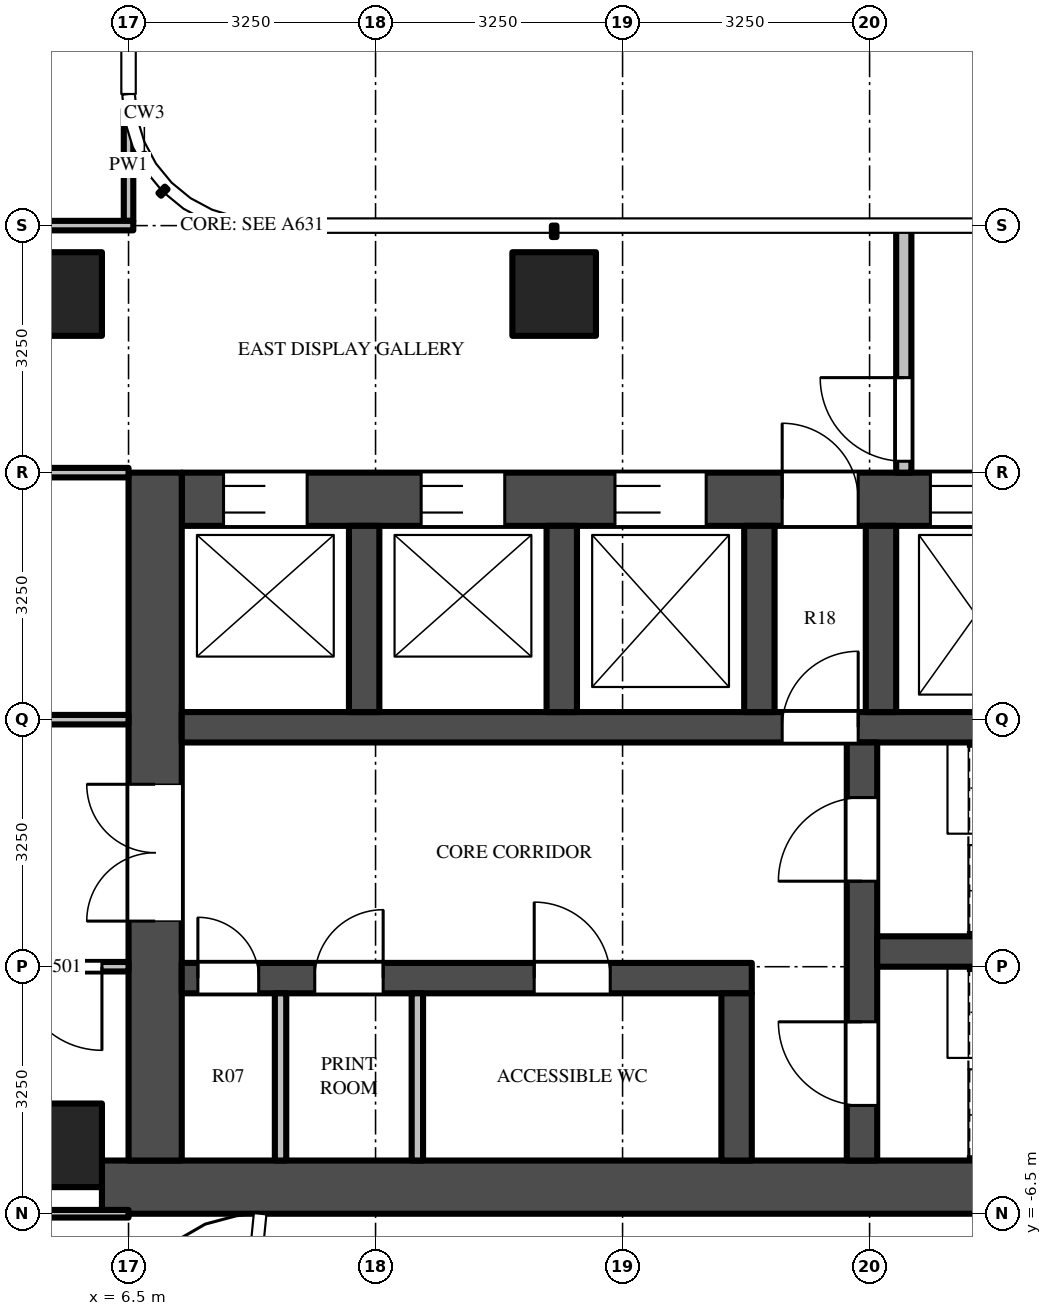
"""IFC4 building model, lengths in metres.
Left out: names, types, materials, properties, quantities, classifications, styles, units other than length and angle.
Written with IfcOpenShell. Run it as: python <this file> out.ifc"""

import sys

from ifc_helpers import new_model, si_unit, direction, frame, frame_2d, origin, origin_2d, place, context, subcontext, project, spatial, rectangle, extrude, source, transform, mapped, element, fill, save


model = new_model("IFC4")
c1 = context("Model", 3, precision=1e-05, world=origin(), true_north=direction((0.0, 1.0)))
c2 = subcontext(c1, "Body", "Model", "MODEL_VIEW")
j1 = project(units=[si_unit("LENGTHUNIT", "METRE"), si_unit("PLANEANGLEUNIT", "RADIAN")], contexts=[c1])
p1 = place(None, origin())
s1 = spatial("IfcSite", under=j1, at=p1, CompositionType="ELEMENT")
p2 = place(p1, origin())
s2 = spatial("IfcBuilding", under=s1, at=p2, CompositionType="ELEMENT")
p3 = place(p2, frame((0.0, 0.0, 248.0)))
s3 = spatial("IfcBuildingStorey", under=s2, at=p3, CompositionType="ELEMENT", Elevation=248.0)
m1 = source(origin(), c2, "Body", "SweptSolid", [
    extrude(rectangle(XDim=1.1, YDim=1.1, at=origin_2d()), origin(), (0.0, 0.0, 1.0), 3.9),
])
for number, where, z_axis, x_axis in (
    (1, (12.1, 5.6, 0.0), (0.0, 0.0, 1.0), (1.0, 0.0, 0.0)),
    (2, (5.6, 5.6, 0.0), (0.0, 0.0, 1.0), (1.0, 0.0, 0.0)),
    (3, (5.6, -5.6, 0.0), (0.0, 0.0, 1.0), (1.0, 0.0, 0.0)),
):
    element("IfcColumn", number, at=place(p3, frame(where, z_axis=z_axis, x_axis=x_axis)), inside=s3, PredefinedType="COLUMN", context=c2, shape_type="MappedRepresentation", body=[
        mapped(m1, transform((0.0, 0.0, 0.0))),
    ])
m2 = source(origin(), c2, "Body", "SweptSolid", [
    extrude(rectangle(XDim=16.6, YDim=0.7, at=frame_2d((8.3, 0.0))), origin(), (0.0, 0.0, 1.0), 3.7),
])
p4 = place(p3, frame((6.15, -6.15, 0.0), z_axis=(0.0, 0.0, 1.0), x_axis=(1.0, 0.0, 0.0)))
e4 = element("IfcWall", 4, at=p4, inside=s3, PredefinedType="SHEAR", context=c2, shape_type="MappedRepresentation", body=[
    mapped(m2, transform((0.0, 0.0, 0.0))),
])
m3 = source(origin(), c2, "Body", "SweptSolid", [
    extrude(rectangle(XDim=14.85, YDim=0.7, at=frame_2d((7.425, 0.0))), origin(), (0.0, 0.0, 1.0), 3.7),
])
p5 = place(p3, frame((7.2, 2.9, 0.0), z_axis=(0.0, 0.0, 1.0), x_axis=(1.0, 0.0, 0.0)))
e5 = element("IfcWall", 5, at=p5, inside=s3, PredefinedType="SHEAR", context=c2, shape_type="MappedRepresentation", body=[
    mapped(m3, transform((0.0, 0.0, 0.0))),
])
m4 = source(origin(), c2, "Body", "SweptSolid", [
    extrude(rectangle(XDim=1.1, YDim=2.1, at=frame_2d((0.55, 1.05))), frame((0.0, 0.36, 0.0), z_axis=(0.0, -1.0, 0.0), x_axis=(1.0, 0.0, 0.0)), (0.0, 0.0, 1.0), 0.72),
])
p6 = place(p5, frame((0.55, 0.0, 0.0)))
e6 = element("IfcOpeningElement", 6, at=p6, cuts=e5, PredefinedType="OPENING", context=c2, shape_type="MappedRepresentation", body=[
    mapped(m4, transform((0.0, 0.0, 0.0))),
])
p7 = place(p5, frame((3.15, 0.0, 0.0)))
e7 = element("IfcOpeningElement", 7, at=p7, cuts=e5, PredefinedType="OPENING", context=c2, shape_type="MappedRepresentation", body=[
    mapped(m4, transform((0.0, 0.0, 0.0))),
])
m5 = source(origin(), c2, "Body", "SweptSolid", [
    extrude(rectangle(XDim=1.2, YDim=2.1, at=frame_2d((0.6, 1.05))), frame((0.0, 0.36, 0.0), z_axis=(0.0, -1.0, 0.0), x_axis=(1.0, 0.0, 0.0)), (0.0, 0.0, 1.0), 0.72),
])
p8 = place(p5, frame((5.7, 0.0, 0.0)))
e8 = element("IfcOpeningElement", 8, at=p8, cuts=e5, PredefinedType="OPENING", context=c2, shape_type="MappedRepresentation", body=[
    mapped(m5, transform((0.0, 0.0, 0.0))),
])
m6 = source(origin(), c2, "Body", "SweptSolid", [
    extrude(rectangle(XDim=1.3, YDim=2.1, at=frame_2d((0.65, 1.05))), frame((0.0, 0.36, 0.0), z_axis=(0.0, -1.0, 0.0), x_axis=(1.0, 0.0, 0.0)), (0.0, 0.0, 1.0), 0.72),
])
p9 = place(p5, frame((12.2, 0.0, 0.0)))
e9 = element("IfcOpeningElement", 9, at=p9, cuts=e5, PredefinedType="OPENING", context=c2, shape_type="MappedRepresentation", body=[
    mapped(m6, transform((0.0, 0.0, 0.0))),
])
p10 = place(p5, frame((9.85, 0.0, 0.0)))
e10 = element("IfcOpeningElement", 10, at=p10, cuts=e5, PredefinedType="OPENING", context=c2, shape_type="MappedRepresentation", body=[
    mapped(m5, transform((0.0, 0.0, 0.0))),
])
m7 = source(origin(), c2, "Body", "SweptSolid", [
    extrude(rectangle(XDim=1.0, YDim=2.1, at=frame_2d((0.5, 1.05))), frame((0.0, 0.36, 0.0), z_axis=(0.0, -1.0, 0.0), x_axis=(1.0, 0.0, 0.0)), (0.0, 0.0, 1.0), 0.72),
])
p11 = place(p5, frame((7.9, 0.0, 0.0)))
e11 = element("IfcOpeningElement", 11, at=p11, cuts=e5, PredefinedType="OPENING", context=c2, shape_type="MappedRepresentation", body=[
    mapped(m7, transform((0.0, 0.0, 0.0))),
])
m8 = source(origin(), c2, "Body", "SweptSolid", [
    extrude(rectangle(XDim=9.05, YDim=0.7, at=frame_2d((4.525, 0.0))), origin(), (0.0, 0.0, 1.0), 3.7),
])
p12 = place(p3, frame((6.85, -5.8, 0.0), z_axis=(0.0, 0.0, 1.0), x_axis=(0.0, 1.0, 0.0)))
e12 = element("IfcWall", 12, at=p12, inside=s3, PredefinedType="SHEAR", context=c2, shape_type="MappedRepresentation", body=[
    mapped(m8, transform((0.0, 0.0, 0.0))),
])
m9 = source(origin(), c2, "Body", "SweptSolid", [
    extrude(rectangle(XDim=1.8, YDim=2.1, at=frame_2d((0.9, 1.05))), frame((0.0, 0.36, 0.0), z_axis=(0.0, -1.0, 0.0), x_axis=(1.0, 0.0, 0.0)), (0.0, 0.0, 1.0), 0.72),
])
p13 = place(p12, frame((3.15, 0.0, 0.0)))
e13 = element("IfcOpeningElement", 13, at=p13, cuts=e12, PredefinedType="OPENING", context=c2, shape_type="MappedRepresentation", body=[
    mapped(m9, transform((0.0, 0.0, 0.0))),
])
m10 = source(origin(), c2, "Body", "SweptSolid", [
    extrude(rectangle(XDim=7.5, YDim=0.4, at=frame_2d((3.75, 0.0))), origin(), (0.0, 0.0, 1.0), 3.7),
])
p14 = place(p3, frame((7.2, -3.4, 0.0), z_axis=(0.0, 0.0, 1.0), x_axis=(1.0, 0.0, 0.0)))
e14 = element("IfcWall", 14, at=p14, inside=s3, PredefinedType="SHEAR", context=c2, shape_type="MappedRepresentation", body=[
    mapped(m10, transform((0.0, 0.0, 0.0))),
])
m11 = source(origin(), c2, "Body", "SweptSolid", [
    extrude(rectangle(XDim=0.8, YDim=2.1, at=frame_2d((0.4, 1.05))), frame((0.0, 0.21, 0.0), z_axis=(0.0, -1.0, 0.0), x_axis=(1.0, 0.0, 0.0)), (0.0, 0.0, 1.0), 0.42),
])
p15 = place(p14, frame((0.212, 0.0, 0.0)))
e15 = element("IfcOpeningElement", 15, at=p15, cuts=e14, PredefinedType="OPENING", context=c2, shape_type="MappedRepresentation", body=[
    mapped(m11, transform((0.0, 0.0, 0.0))),
])
m12 = source(origin(), c2, "Body", "SweptSolid", [
    extrude(rectangle(XDim=0.9, YDim=2.1, at=frame_2d((0.45, 1.05))), frame((0.0, 0.21, 0.0), z_axis=(0.0, -1.0, 0.0), x_axis=(1.0, 0.0, 0.0)), (0.0, 0.0, 1.0), 0.42),
])
p16 = place(p14, frame((1.75, 0.0, 0.0)))
e16 = element("IfcOpeningElement", 16, at=p16, cuts=e14, PredefinedType="OPENING", context=c2, shape_type="MappedRepresentation", body=[
    mapped(m12, transform((0.0, 0.0, 0.0))),
])
m13 = source(origin(), c2, "Body", "SweptSolid", [
    extrude(rectangle(XDim=1.0, YDim=2.1, at=frame_2d((0.5, 1.05))), frame((0.0, 0.21, 0.0), z_axis=(0.0, -1.0, 0.0), x_axis=(1.0, 0.0, 0.0)), (0.0, 0.0, 1.0), 0.42),
])
p17 = place(p14, frame((4.637, 0.0, 0.0)))
e17 = element("IfcOpeningElement", 17, at=p17, cuts=e14, PredefinedType="OPENING", context=c2, shape_type="MappedRepresentation", body=[
    mapped(m13, transform((0.0, 0.0, 0.0))),
])
m14 = source(origin(), c2, "Body", "SweptSolid", [
    extrude(rectangle(XDim=14.85, YDim=0.4, at=frame_2d((7.425, 0.0))), origin(), (0.0, 0.0, 1.0), 3.7),
])
p18 = place(p3, frame((7.2, -0.1, 0.0), z_axis=(0.0, 0.0, 1.0), x_axis=(1.0, 0.0, 0.0)))
e18 = element("IfcWall", 18, at=p18, inside=s3, PredefinedType="SHEAR", context=c2, shape_type="MappedRepresentation", body=[
    mapped(m14, transform((0.0, 0.0, 0.0))),
])
p19 = place(p18, frame((7.9, 0.0, 0.0)))
e19 = element("IfcOpeningElement", 19, at=p19, cuts=e18, PredefinedType="OPENING", context=c2, shape_type="MappedRepresentation", body=[
    mapped(m13, transform((0.0, 0.0, 0.0))),
])
m15 = source(origin(), c2, "Body", "SweptSolid", [
    extrude(rectangle(XDim=5.5, YDim=0.4, at=frame_2d((2.75, 0.0))), origin(), (0.0, 0.0, 1.0), 3.7),
])
p20 = place(p3, frame((16.15, -5.8, 0.0), z_axis=(0.0, 0.0, 1.0), x_axis=(0.0, 1.0, 0.0)))
e20 = element("IfcWall", 20, at=p20, inside=s3, PredefinedType="SHEAR", context=c2, shape_type="MappedRepresentation", body=[
    mapped(m15, transform((0.0, 0.0, 0.0))),
])
m16 = source(origin(), c2, "Body", "SweptSolid", [
    extrude(rectangle(XDim=1.1, YDim=2.1, at=frame_2d((0.55, 1.05))), frame((0.0, 0.21, 0.0), z_axis=(0.0, -1.0, 0.0), x_axis=(1.0, 0.0, 0.0)), (0.0, 0.0, 1.0), 0.42),
])
p21 = place(p20, frame((0.725, 0.0, 0.0)))
e21 = element("IfcOpeningElement", 21, at=p21, cuts=e20, PredefinedType="OPENING", context=c2, shape_type="MappedRepresentation", body=[
    mapped(m16, transform((0.0, 0.0, 0.0))),
])
p22 = place(p20, frame((3.675, 0.0, 0.0)))
e22 = element("IfcOpeningElement", 22, at=p22, cuts=e20, PredefinedType="OPENING", context=c2, shape_type="MappedRepresentation", body=[
    mapped(m16, transform((0.0, 0.0, 0.0))),
])
m17 = source(origin(), c2, "Body", "SweptSolid", [
    extrude(rectangle(XDim=5.7, YDim=0.4, at=frame_2d((2.85, 0.0))), origin(), (0.0, 0.0, 1.0), 3.7),
])
p23 = place(p3, frame((16.35, -3.05, 0.0), z_axis=(0.0, 0.0, 1.0), x_axis=(1.0, 0.0, 0.0)))
e23 = element("IfcWall", 23, at=p23, inside=s3, PredefinedType="SHEAR", context=c2, shape_type="MappedRepresentation", body=[
    mapped(m17, transform((0.0, 0.0, 0.0))),
])
m18 = source(origin(), c2, "Body", "SweptSolid", [
    extrude(rectangle(XDim=2.2, YDim=0.4, at=frame_2d((1.1, 0.0))), origin(), (0.0, 0.0, 1.0), 3.7),
])
p24 = place(p3, frame((14.5, -5.8, 0.0), z_axis=(0.0, 0.0, 1.0), x_axis=(0.0, 1.0, 0.0)))
e24 = element("IfcWall", 24, at=p24, inside=s3, PredefinedType="SHEAR", context=c2, shape_type="MappedRepresentation", body=[
    mapped(m18, transform((0.0, 0.0, 0.0))),
])
m19 = source(origin(), c2, "Body", "SweptSolid", [
    extrude(rectangle(XDim=2.45, YDim=0.4, at=frame_2d((1.225, 0.0))), origin(), (0.0, 0.0, 1.0), 3.7),
])
for number, where, z_axis, x_axis in (
    (25, (9.6, 0.1, 0.0), (0.0, 0.0, 1.0), (0.0, 1.0, 0.0)),
    (26, (12.2, 0.1, 0.0), (0.0, 0.0, 1.0), (0.0, 1.0, 0.0)),
    (27, (14.8, 0.1, 0.0), (0.0, 0.0, 1.0), (0.0, 1.0, 0.0)),
    (28, (16.4, 0.1, 0.0), (0.0, 0.0, 1.0), (0.0, 1.0, 0.0)),
):
    element("IfcWall", number, at=place(p3, frame(where, z_axis=z_axis, x_axis=x_axis)), inside=s3, PredefinedType="SHEAR", context=c2, shape_type="MappedRepresentation", body=[
        mapped(m19, transform((0.0, 0.0, 0.0))),
    ])
m20 = source(origin(), c2, "Body", "SweptSolid", [
    extrude(rectangle(XDim=3.25, YDim=0.2, at=frame_2d((1.625, 0.0))), origin(), (0.0, 0.0, 1.0), 3.7),
])
p25 = place(p3, frame((16.7, 3.25, 0.0), z_axis=(0.0, 0.0, 1.0), x_axis=(0.0, 1.0, 0.0)))
e29 = element("IfcWall", 29, at=p25, inside=s3, PredefinedType="PARTITIONING", context=c2, shape_type="MappedRepresentation", body=[
    mapped(m20, transform((0.0, 0.0, 0.0))),
])
m21 = source(origin(), c2, "Body", "SweptSolid", [
    extrude(rectangle(XDim=1.1, YDim=2.1, at=frame_2d((0.55, 1.05))), frame((0.0, 0.11, 0.0), z_axis=(0.0, -1.0, 0.0), x_axis=(1.0, 0.0, 0.0)), (0.0, 0.0, 1.0), 0.22),
])
p26 = place(p25, frame((0.15, 0.0, 0.0)))
e30 = element("IfcOpeningElement", 30, at=p26, cuts=e29, PredefinedType="OPENING", context=c2, shape_type="MappedRepresentation", body=[
    mapped(m21, transform((0.0, 0.0, 0.0))),
])
m22 = source(origin(), c2, "Body", "SweptSolid", [
    extrude(rectangle(XDim=2.2, YDim=0.15, at=frame_2d((1.1, 0.0))), origin(), (0.0, 0.0, 1.0), 3.7),
])
for number, where, z_axis, x_axis in (
    (31, (8.5, -5.8, 0.0), (0.0, 0.0, 1.0), (0.0, 1.0, 0.0)),
    (32, (10.3, -5.8, 0.0), (0.0, 0.0, 1.0), (0.0, 1.0, 0.0)),
):
    element("IfcWall", number, at=place(p3, frame(where, z_axis=z_axis, x_axis=x_axis)), inside=s3, PredefinedType="PARTITIONING", context=c2, shape_type="MappedRepresentation", body=[
        mapped(m22, transform((0.0, 0.0, 0.0))),
    ])
m23 = source(origin(), c2, "Body", "SweptSolid", [
    extrude(rectangle(XDim=1.469, YDim=0.125, at=frame_2d((0.734, 0.0))), origin(), (0.0, 0.0, 1.0), 3.7),
])
p27 = place(p3, frame((6.5, 6.562, 0.0), z_axis=(0.0, 0.0, 1.0), x_axis=(0.0, 1.0, 0.0)))
e33 = element("IfcWall", 33, at=p27, inside=s3, PredefinedType="PARTITIONING", context=c2, shape_type="MappedRepresentation", body=[
    mapped(m23, transform((0.0, 0.0, 0.0))),
])
m24 = source(origin(), c2, "Body", "SweptSolid", [
    extrude(rectangle(XDim=5.238, YDim=0.1, at=frame_2d((2.619, 0.0))), origin(), (0.0, 0.0, 1.0), 2.78),
])
p28 = place(p3, frame((1.262, -6.5, 0.0), z_axis=(0.0, 0.0, 1.0), x_axis=(1.0, 0.0, 0.0)))
e34 = element("IfcWall", 34, at=p28, inside=s3, PredefinedType="PARTITIONING", context=c2, shape_type="MappedRepresentation", body=[
    mapped(m24, transform((0.0, 0.0, 0.0))),
])
m25 = source(origin(), c2, "Body", "SweptSolid", [
    extrude(rectangle(XDim=5.363, YDim=0.125, at=frame_2d((2.681, 0.0))), origin(), (0.0, 0.0, 1.0), 2.997),
])
p29 = place(p3, frame((6.5, -3.25, 0.0), z_axis=(0.0, 0.0, 1.0), x_axis=(-1.0, 0.0, 0.0)))
e35 = element("IfcWall", 35, at=p29, inside=s3, PredefinedType="PARTITIONING", context=c2, shape_type="MappedRepresentation", body=[
    mapped(m25, transform((0.0, 0.0, 0.0))),
])
m26 = source(origin(), c2, "Body", "SweptSolid", [
    extrude(rectangle(XDim=1.1, YDim=2.1, at=frame_2d((0.55, 1.05))), frame((0.0, 0.073, 0.0), z_axis=(0.0, -1.0, 0.0), x_axis=(1.0, 0.0, 0.0)), (0.0, 0.0, 1.0), 0.145),
])
p30 = place(p29, frame((0.35, 0.0, 0.0)))
e36 = element("IfcOpeningElement", 36, at=p30, cuts=e35, PredefinedType="OPENING", context=c2, shape_type="MappedRepresentation", body=[
    mapped(m26, transform((0.0, 0.0, 0.0))),
])
p31 = place(p3, frame((6.5, 0.0, 0.0), z_axis=(0.0, 0.0, 1.0), x_axis=(-1.0, 0.0, 0.0)))
e37 = element("IfcWall", 37, at=p31, inside=s3, PredefinedType="PARTITIONING", context=c2, shape_type="MappedRepresentation", body=[
    mapped(m25, transform((0.0, 0.0, 0.0))),
])
m27 = source(origin(), c2, "Body", "SweptSolid", [
    extrude(rectangle(XDim=1.0, YDim=2.1, at=frame_2d((0.5, 1.05))), frame((0.0, 0.073, 0.0), z_axis=(0.0, -1.0, 0.0), x_axis=(1.0, 0.0, 0.0)), (0.0, 0.0, 1.0), 0.145),
])
p32 = place(p31, frame((3.95, 0.0, 0.0)))
e38 = element("IfcOpeningElement", 38, at=p32, cuts=e37, PredefinedType="OPENING", context=c2, shape_type="MappedRepresentation", body=[
    mapped(m27, transform((0.0, 0.0, 0.0))),
])
p33 = place(p3, frame((1.137, 3.25, 0.0), z_axis=(0.0, 0.0, 1.0), x_axis=(1.0, 0.0, 0.0)))
e39 = element("IfcWall", 39, at=p33, inside=s3, PredefinedType="PARTITIONING", context=c2, shape_type="MappedRepresentation", body=[
    mapped(m25, transform((0.0, 0.0, 0.0))),
])
m28 = source(origin(), c2, "Body", "SweptSolid", [
    extrude(rectangle(XDim=5.425, YDim=0.125, at=frame_2d((2.712, 0.0))), origin(), (0.0, 0.0, 1.0), 2.78),
])
p34 = place(p3, frame((1.137, 6.5, 0.0), z_axis=(0.0, 0.0, 1.0), x_axis=(1.0, 0.0, 0.0)))
e40 = element("IfcWall", 40, at=p34, inside=s3, PredefinedType="PARTITIONING", context=c2, shape_type="MappedRepresentation", body=[
    mapped(m28, transform((0.0, 0.0, 0.0))),
])
p35 = place(p34, frame((0.413, 0.0, 0.0)))
e41 = element("IfcOpeningElement", 41, at=p35, cuts=e40, PredefinedType="OPENING", context=c2, shape_type="MappedRepresentation", body=[
    mapped(m27, transform((0.0, 0.0, 0.0))),
])
m29 = source(origin(), c2, "Body", "SweptSolid", [
    extrude(rectangle(XDim=1.1, YDim=2.1, at=frame_2d((0.55, 1.05))), frame((0.0, -0.275, 0.0), z_axis=(0.0, -1.0, 0.0), x_axis=(1.0, 0.0, 0.0)), (0.0, 0.0, 1.0), 0.05),
])
p36 = place(p6, origin())
e42 = element("IfcDoor", 42, at=p36, inside=s3, OperationType="DOUBLE_DOOR_SLIDING", PredefinedType="DOOR", context=c2, shape_type="MappedRepresentation", body=[
    mapped(m29, transform((0.0, 0.0, 0.0))),
])
fill(e6, e42)
p37 = place(p7, origin())
e43 = element("IfcDoor", 43, at=p37, inside=s3, OperationType="DOUBLE_DOOR_SLIDING", PredefinedType="DOOR", context=c2, shape_type="MappedRepresentation", body=[
    mapped(m29, transform((0.0, 0.0, 0.0))),
])
fill(e7, e43)
m30 = source(origin(), c2, "Body", "SweptSolid", [
    extrude(rectangle(XDim=1.2, YDim=2.1, at=frame_2d((0.6, 1.05))), frame((0.0, -0.275, 0.0), z_axis=(0.0, -1.0, 0.0), x_axis=(1.0, 0.0, 0.0)), (0.0, 0.0, 1.0), 0.05),
])
p38 = place(p8, origin())
e44 = element("IfcDoor", 44, at=p38, inside=s3, OperationType="DOUBLE_DOOR_SLIDING", PredefinedType="DOOR", context=c2, shape_type="MappedRepresentation", body=[
    mapped(m30, transform((0.0, 0.0, 0.0))),
])
fill(e8, e44)
p39 = place(p10, origin())
e45 = element("IfcDoor", 45, at=p39, inside=s3, OperationType="DOUBLE_DOOR_SLIDING", PredefinedType="DOOR", context=c2, shape_type="MappedRepresentation", body=[
    mapped(m30, transform((0.0, 0.0, 0.0))),
])
fill(e10, e45)
m31 = source(origin(), c2, "Body", "SweptSolid", [
    extrude(rectangle(XDim=1.8, YDim=2.1, at=frame_2d((0.9, 1.05))), frame((0.0, -0.275, 0.0), z_axis=(0.0, -1.0, 0.0), x_axis=(1.0, 0.0, 0.0)), (0.0, 0.0, 1.0), 0.05),
])
p40 = place(p13, origin())
e46 = element("IfcDoor", 46, at=p40, inside=s3, OperationType="DOUBLE_DOOR_SINGLE_SWING", PredefinedType="DOOR", context=c2, shape_type="MappedRepresentation", body=[
    mapped(m31, transform((0.0, 0.0, 0.0))),
])
fill(e13, e46)
m32 = source(origin(), c2, "Body", "SweptSolid", [
    extrude(rectangle(XDim=1.1, YDim=2.1, at=frame_2d((0.55, 1.05))), frame((0.0, 0.025, 0.0), z_axis=(0.0, -1.0, 0.0), x_axis=(1.0, 0.0, 0.0)), (0.0, 0.0, 1.0), 0.05),
])
p41 = place(p21, origin())
e47 = element("IfcDoor", 47, at=p41, inside=s3, OperationType="SINGLE_SWING_RIGHT", PredefinedType="DOOR", context=c2, shape_type="MappedRepresentation", body=[
    mapped(m32, transform((0.0, 0.0, 0.0))),
])
fill(e21, e47)
p42 = place(p22, origin())
e48 = element("IfcDoor", 48, at=p42, inside=s3, OperationType="SINGLE_SWING_LEFT", PredefinedType="DOOR", context=c2, shape_type="MappedRepresentation", body=[
    mapped(m32, transform((0.0, 0.0, 0.0))),
])
fill(e22, e48)
m33 = source(origin(), c2, "Body", "SweptSolid", [
    extrude(rectangle(XDim=1.0, YDim=2.1, at=frame_2d((0.5, 1.05))), frame((0.0, 0.025, 0.0), z_axis=(0.0, -1.0, 0.0), x_axis=(1.0, 0.0, 0.0)), (0.0, 0.0, 1.0), 0.05),
])
p43 = place(p19, origin())
e49 = element("IfcDoor", 49, at=p43, inside=s3, OperationType="SINGLE_SWING_RIGHT", PredefinedType="DOOR", context=c2, shape_type="MappedRepresentation", body=[
    mapped(m33, transform((0.0, 0.0, 0.0))),
])
fill(e19, e49)
m34 = source(origin(), c2, "Body", "SweptSolid", [
    extrude(rectangle(XDim=1.0, YDim=2.1, at=frame_2d((0.5, 1.05))), frame((0.0, -0.275, 0.0), z_axis=(0.0, -1.0, 0.0), x_axis=(1.0, 0.0, 0.0)), (0.0, 0.0, 1.0), 0.05),
])
p44 = place(p11, origin())
e50 = element("IfcDoor", 50, at=p44, inside=s3, OperationType="SINGLE_SWING_LEFT", PredefinedType="DOOR", context=c2, shape_type="MappedRepresentation", body=[
    mapped(m34, transform((0.0, 0.0, 0.0))),
])
fill(e11, e50)
p45 = place(p26, origin())
e51 = element("IfcDoor", 51, at=p45, inside=s3, OperationType="SINGLE_SWING_RIGHT", PredefinedType="DOOR", context=c2, shape_type="MappedRepresentation", body=[
    mapped(m32, transform((0.0, 0.0, 0.0))),
])
fill(e30, e51)
m35 = source(origin(), c2, "Body", "SweptSolid", [
    extrude(rectangle(XDim=0.8, YDim=2.1, at=frame_2d((0.4, 1.05))), frame((0.0, 0.025, 0.0), z_axis=(0.0, -1.0, 0.0), x_axis=(1.0, 0.0, 0.0)), (0.0, 0.0, 1.0), 0.05),
])
p46 = place(p15, origin())
e52 = element("IfcDoor", 52, at=p46, inside=s3, OperationType="SINGLE_SWING_LEFT", PredefinedType="DOOR", context=c2, shape_type="MappedRepresentation", body=[
    mapped(m35, transform((0.0, 0.0, 0.0))),
])
fill(e15, e52)
m36 = source(origin(), c2, "Body", "SweptSolid", [
    extrude(rectangle(XDim=0.9, YDim=2.1, at=frame_2d((0.45, 1.05))), frame((0.0, 0.025, 0.0), z_axis=(0.0, -1.0, 0.0), x_axis=(1.0, 0.0, 0.0)), (0.0, 0.0, 1.0), 0.05),
])
p47 = place(p16, origin())
e53 = element("IfcDoor", 53, at=p47, inside=s3, OperationType="SINGLE_SWING_RIGHT", PredefinedType="DOOR", context=c2, shape_type="MappedRepresentation", body=[
    mapped(m36, transform((0.0, 0.0, 0.0))),
])
fill(e16, e53)
p48 = place(p17, origin())
e54 = element("IfcDoor", 54, at=p48, inside=s3, OperationType="SINGLE_SWING_LEFT", PredefinedType="DOOR", context=c2, shape_type="MappedRepresentation", body=[
    mapped(m33, transform((0.0, 0.0, 0.0))),
])
fill(e17, e54)
p49 = place(p30, origin())
e55 = element("IfcDoor", 55, at=p49, inside=s3, OperationType="SINGLE_SWING_LEFT", PredefinedType="DOOR", context=c2, shape_type="MappedRepresentation", body=[
    mapped(m32, transform((0.0, 0.0, 0.0))),
])
fill(e36, e55)
save(model, sys.argv[1])
